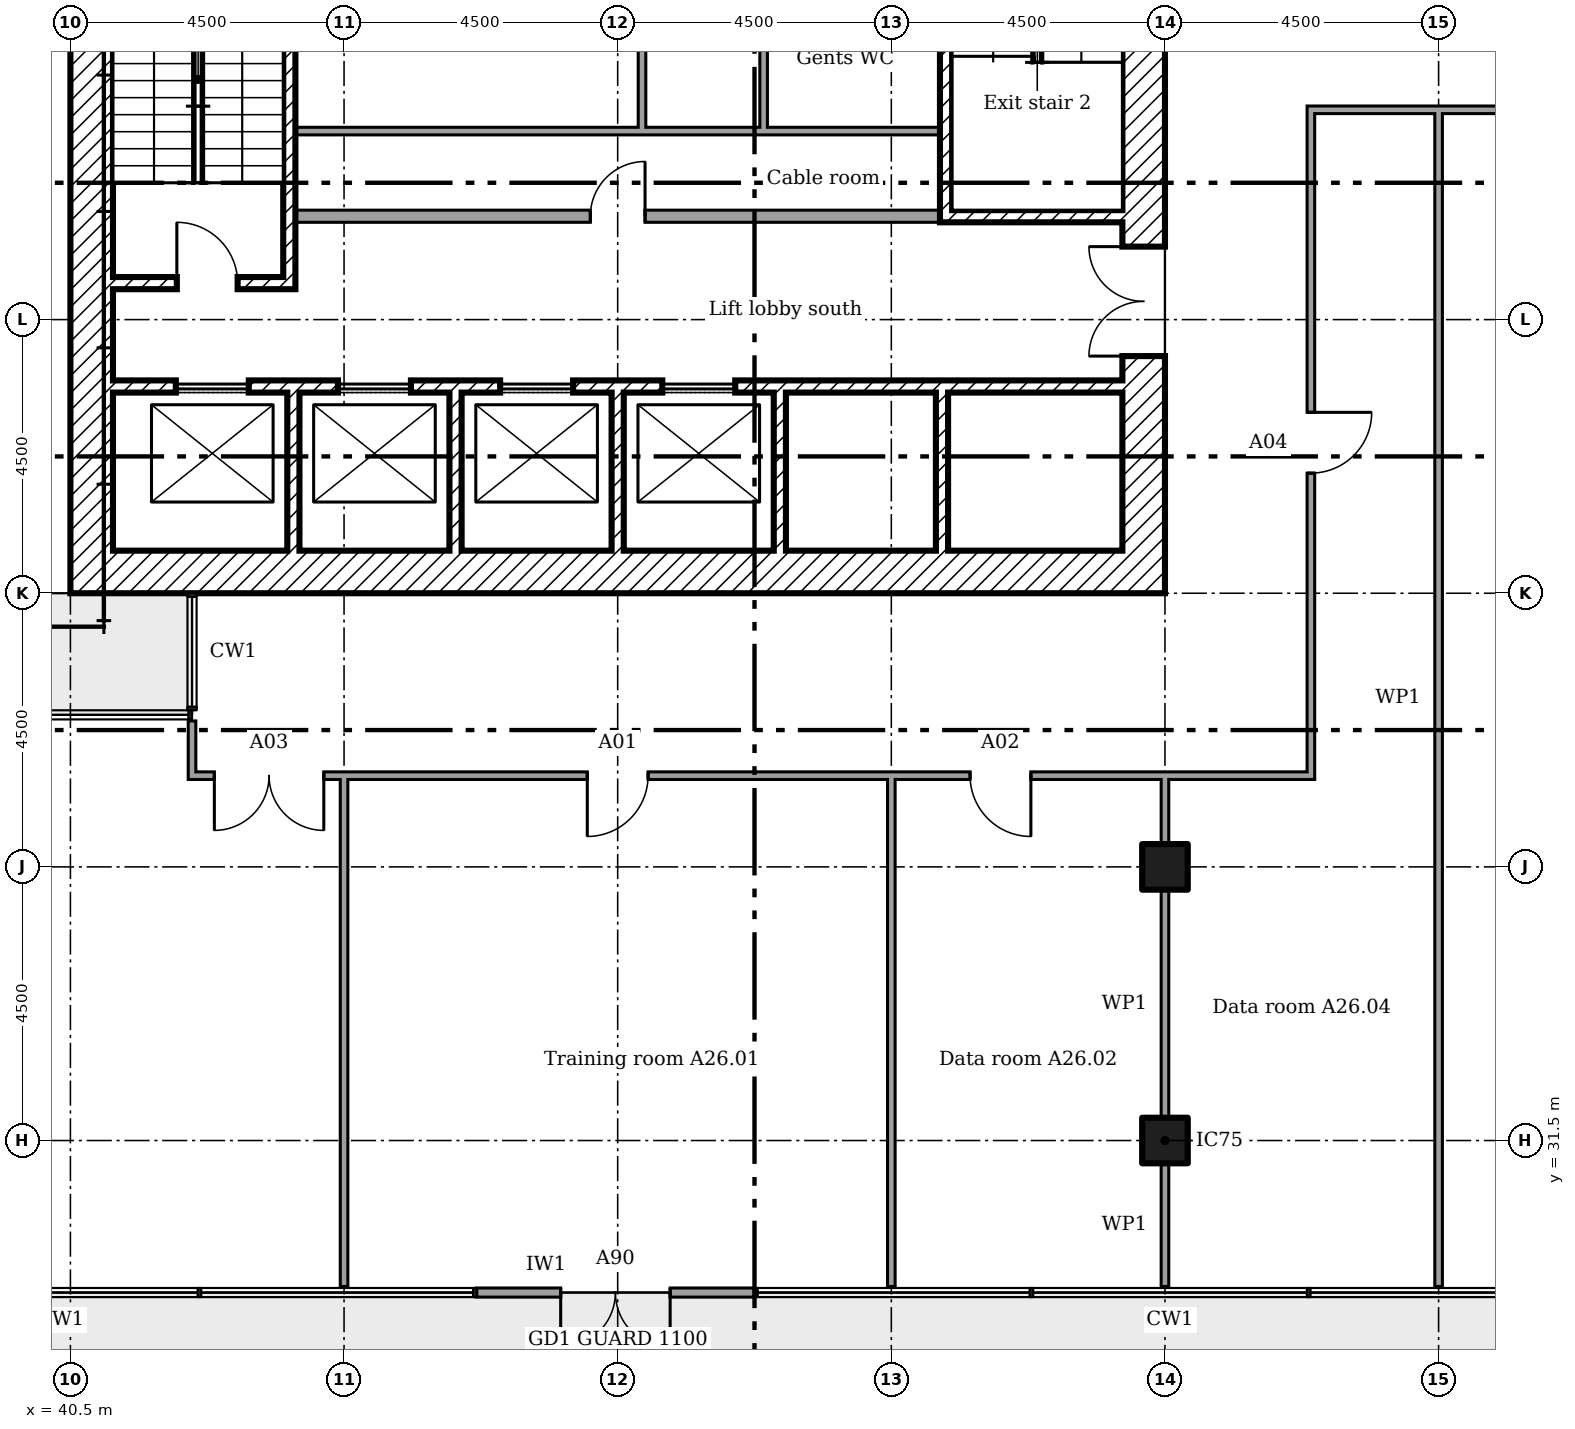
"""IFC4 building model, lengths in metres.
Left out: names, types, materials, properties, quantities, classifications, styles, units other than length and angle.
Written with IfcOpenShell. Run it as: python <this file> out.ifc"""

import sys

from ifc_helpers import new_model, si_unit, direction, frame, frame_2d, origin, origin_2d, place, context, subcontext, project, spatial, rectangle, extrude, element, fill, save


model = new_model("IFC4")
c1 = context("Model", 3, precision=1e-05, world=origin(), true_north=direction((0.0, 1.0)))
c2 = subcontext(c1, "Body", "Model", "MODEL_VIEW")
j1 = project(units=[si_unit("LENGTHUNIT", "METRE"), si_unit("PLANEANGLEUNIT", "RADIAN")], contexts=[c1])
p1 = place(None, origin())
s1 = spatial("IfcSite", under=j1, at=p1, CompositionType="ELEMENT")
p2 = place(p1, origin())
s2 = spatial("IfcBuilding", under=s1, at=p2, CompositionType="ELEMENT")
p3 = place(p2, frame((0.0, 0.0, 106.4)))
s3 = spatial("IfcBuildingStorey", under=s2, at=p3, CompositionType="ELEMENT", Elevation=106.4)
for number, where in (
    (1, (58.5, 31.5, 0.0)),
    (2, (58.5, 36.0, 0.0)),
):
    element("IfcColumn", number, at=place(p3, frame(where)), inside=s3, PredefinedType="COLUMN", context=c2, shape_type="SweptSolid", body=[
        extrude(rectangle(XDim=0.75, YDim=0.75, at=origin_2d()), origin(), (0.0, 0.0, 1.0), 3.6),
    ])
p4 = place(p3, frame((47.182, 29.0, 0.0)))
e3 = element("IfcWall", 3, at=p4, inside=s3, PredefinedType="SOLIDWALL", context=c2, shape_type="SweptSolid", body=[
    extrude(rectangle(XDim=4.561, YDim=0.15, at=frame_2d((2.28, 0.0))), origin(), (0.0, 0.0, 1.0), 3.45),
])
p5 = place(p4, frame((1.38, 0.0, 0.0)))
e4 = element("IfcOpeningElement", 4, at=p5, cuts=e3, PredefinedType="OPENING", context=c2, shape_type="SweptSolid", body=[
    extrude(rectangle(XDim=1.8, YDim=2.4, at=frame_2d((0.9, 1.2))), frame((0.0, 0.085, 0.0), z_axis=(0.0, -1.0, 0.0), x_axis=(1.0, 0.0, 0.0)), (0.0, 0.0, 1.0), 0.17),
])
p6 = place(p3, frame((58.15, 40.5, 0.0), z_axis=(0.0, 0.0, 1.0), x_axis=(0.0, 1.0, 0.0)))
e5 = element("IfcWall", 5, at=p6, inside=s3, PredefinedType="SHEAR", context=c2, shape_type="SweptSolid", body=[
    extrude(rectangle(XDim=18.0, YDim=0.7, at=frame_2d((9.0, 0.0))), origin(), (0.0, 0.0, 1.0), 3.35),
])
p7 = place(p6, frame((13.15, 0.0, 0.0)))
e6 = element("IfcOpeningElement", 6, at=p7, cuts=e5, PredefinedType="OPENING", context=c2, shape_type="SweptSolid", body=[
    extrude(rectangle(XDim=1.2, YDim=2.1, at=frame_2d((0.6, 1.05))), frame((0.0, 0.36, 0.0), z_axis=(0.0, -1.0, 0.0), x_axis=(1.0, 0.0, 0.0)), (0.0, 0.0, 1.0), 0.72),
])
p8 = place(p6, frame((3.9, 0.0, 0.0)))
e7 = element("IfcOpeningElement", 7, at=p8, cuts=e5, PredefinedType="OPENING", context=c2, shape_type="SweptSolid", body=[
    extrude(rectangle(XDim=1.8, YDim=2.1, at=frame_2d((0.9, 1.05))), frame((0.0, 0.36, 0.0), z_axis=(0.0, -1.0, 0.0), x_axis=(1.0, 0.0, 0.0)), (0.0, 0.0, 1.0), 0.72),
])
p9 = place(p6, frame((11.525, 0.0, 0.0)))
e8 = element("IfcOpeningElement", 8, at=p9, cuts=e5, PredefinedType="OPENING", context=c2, shape_type="SweptSolid", body=[
    extrude(rectangle(XDim=1.0, YDim=2.1, at=frame_2d((0.5, 1.05))), frame((0.0, 0.36, 0.0), z_axis=(0.0, -1.0, 0.0), x_axis=(1.0, 0.0, 0.0)), (0.0, 0.0, 1.0), 0.72),
])
p10 = place(p3, frame((41.2, 40.85, 0.0)))
e9 = element("IfcWall", 9, at=p10, inside=s3, PredefinedType="SHEAR", context=c2, shape_type="SweptSolid", body=[
    extrude(rectangle(XDim=16.6, YDim=0.7, at=frame_2d((8.3, 0.0))), origin(), (0.0, 0.0, 1.0), 3.35),
])
p11 = place(p3, frame((40.85, 40.5, 0.0), z_axis=(0.0, 0.0, 1.0), x_axis=(0.0, 1.0, 0.0)))
e10 = element("IfcWall", 10, at=p11, inside=s3, PredefinedType="SHEAR", context=c2, shape_type="SweptSolid", body=[
    extrude(rectangle(XDim=18.0, YDim=0.7, at=frame_2d((9.0, 0.0))), origin(), (0.0, 0.0, 1.0), 3.35),
])
for number, where, z_axis, x_axis in (
    (11, (44.167, 41.2, 0.0), (0.0, 0.0, 1.0), (0.0, 1.0, 0.0)),
    (12, (46.833, 41.2, 0.0), (0.0, 0.0, 1.0), (0.0, 1.0, 0.0)),
    (13, (49.5, 41.2, 0.0), (0.0, 0.0, 1.0), (0.0, 1.0, 0.0)),
    (14, (52.167, 41.2, 0.0), (0.0, 0.0, 1.0), (0.0, 1.0, 0.0)),
    (15, (54.833, 41.2, 0.0), (0.0, 0.0, 1.0), (0.0, 1.0, 0.0)),
):
    element("IfcWall", number, at=place(p3, frame(where, z_axis=z_axis, x_axis=x_axis)), inside=s3, PredefinedType="SHEAR", context=c2, shape_type="SweptSolid", body=[
        extrude(rectangle(XDim=2.6, YDim=0.2, at=frame_2d((1.3, 0.0))), origin(), (0.0, 0.0, 1.0), 3.35),
    ])
p12 = place(p3, frame((41.2, 43.9, 0.0)))
e16 = element("IfcWall", 16, at=p12, inside=s3, PredefinedType="SHEAR", context=c2, shape_type="SweptSolid", body=[
    extrude(rectangle(XDim=16.6, YDim=0.2, at=frame_2d((8.3, 0.0))), origin(), (0.0, 0.0, 1.0), 3.35),
])
p13 = place(p12, frame((1.033, 0.0, 0.0)))
e17 = element("IfcOpeningElement", 17, at=p13, cuts=e16, PredefinedType="OPENING", context=c2, shape_type="SweptSolid", body=[
    extrude(rectangle(XDim=1.2, YDim=2.1, at=frame_2d((0.6, 1.05))), frame((0.0, 0.11, 0.0), z_axis=(0.0, -1.0, 0.0), x_axis=(1.0, 0.0, 0.0)), (0.0, 0.0, 1.0), 0.22),
])
p14 = place(p12, frame((3.7, 0.0, 0.0)))
e18 = element("IfcOpeningElement", 18, at=p14, cuts=e16, PredefinedType="OPENING", context=c2, shape_type="SweptSolid", body=[
    extrude(rectangle(XDim=1.2, YDim=2.1, at=frame_2d((0.6, 1.05))), frame((0.0, 0.11, 0.0), z_axis=(0.0, -1.0, 0.0), x_axis=(1.0, 0.0, 0.0)), (0.0, 0.0, 1.0), 0.22),
])
p15 = place(p12, frame((6.367, 0.0, 0.0)))
e19 = element("IfcOpeningElement", 19, at=p15, cuts=e16, PredefinedType="OPENING", context=c2, shape_type="SweptSolid", body=[
    extrude(rectangle(XDim=1.2, YDim=2.1, at=frame_2d((0.6, 1.05))), frame((0.0, 0.11, 0.0), z_axis=(0.0, -1.0, 0.0), x_axis=(1.0, 0.0, 0.0)), (0.0, 0.0, 1.0), 0.22),
])
p16 = place(p12, frame((9.033, 0.0, 0.0)))
e20 = element("IfcOpeningElement", 20, at=p16, cuts=e16, PredefinedType="OPENING", context=c2, shape_type="SweptSolid", body=[
    extrude(rectangle(XDim=1.2, YDim=2.1, at=frame_2d((0.6, 1.05))), frame((0.0, 0.11, 0.0), z_axis=(0.0, -1.0, 0.0), x_axis=(1.0, 0.0, 0.0)), (0.0, 0.0, 1.0), 0.22),
])
p17 = place(p3, frame((44.1, 45.5, 0.0), z_axis=(0.0, 0.0, 1.0), x_axis=(0.0, 1.0, 0.0)))
e21 = element("IfcWall", 21, at=p17, inside=s3, PredefinedType="SHEAR", context=c2, shape_type="SweptSolid", body=[
    extrude(rectangle(XDim=6.9, YDim=0.2, at=frame_2d((3.45, 0.0))), origin(), (0.0, 0.0, 1.0), 3.35),
])
p18 = place(p3, frame((41.2, 45.6, 0.0)))
e22 = element("IfcWall", 22, at=p18, inside=s3, PredefinedType="SHEAR", context=c2, shape_type="SweptSolid", body=[
    extrude(rectangle(XDim=2.8, YDim=0.2, at=frame_2d((1.4, 0.0))), origin(), (0.0, 0.0, 1.0), 3.35),
])
p19 = place(p18, frame((1.05, 0.0, 0.0)))
e23 = element("IfcOpeningElement", 23, at=p19, cuts=e22, PredefinedType="OPENING", context=c2, shape_type="SweptSolid", body=[
    extrude(rectangle(XDim=1.0, YDim=2.1, at=frame_2d((0.5, 1.05))), frame((0.0, 0.11, 0.0), z_axis=(0.0, -1.0, 0.0), x_axis=(1.0, 0.0, 0.0)), (0.0, 0.0, 1.0), 0.22),
])
p20 = place(p3, frame((54.8, 46.7, 0.0)))
e24 = element("IfcWall", 24, at=p20, inside=s3, PredefinedType="SHEAR", context=c2, shape_type="SweptSolid", body=[
    extrude(rectangle(XDim=3.0, YDim=0.2, at=frame_2d((1.5, 0.0))), origin(), (0.0, 0.0, 1.0), 3.35),
])
p21 = place(p3, frame((54.9, 46.8, 0.0), z_axis=(0.0, 0.0, 1.0), x_axis=(0.0, 1.0, 0.0)))
e25 = element("IfcWall", 25, at=p21, inside=s3, PredefinedType="SHEAR", context=c2, shape_type="SweptSolid", body=[
    extrude(rectangle(XDim=6.5, YDim=0.2, at=frame_2d((3.25, 0.0))), origin(), (0.0, 0.0, 1.0), 3.35),
])
p22 = place(p3, frame((44.2, 46.7, 0.0)))
e26 = element("IfcWall", 26, at=p22, inside=s3, PredefinedType="PARTITIONING", context=c2, shape_type="SweptSolid", body=[
    extrude(rectangle(XDim=10.6, YDim=0.2, at=frame_2d((5.3, 0.0))), origin(), (0.0, 0.0, 1.0), 3.35),
])
p23 = place(p22, frame((4.85, 0.0, 0.0)))
e27 = element("IfcOpeningElement", 27, at=p23, cuts=e26, PredefinedType="OPENING", context=c2, shape_type="SweptSolid", body=[
    extrude(rectangle(XDim=0.9, YDim=2.1, at=frame_2d((0.45, 1.05))), frame((0.0, 0.11, 0.0), z_axis=(0.0, -1.0, 0.0), x_axis=(1.0, 0.0, 0.0)), (0.0, 0.0, 1.0), 0.22),
])
p24 = place(p3, frame((49.962, 48.1, 0.0), z_axis=(0.0, 0.0, 1.0), x_axis=(-1.0, 0.0, 0.0)))
e28 = element("IfcWall", 28, at=p24, inside=s3, PredefinedType="PARTITIONING", context=c2, shape_type="SweptSolid", body=[
    extrude(rectangle(XDim=5.762, YDim=0.125, at=frame_2d((2.881, 0.0))), origin(), (0.0, 0.0, 1.0), 3.35),
])
p25 = place(p3, frame((51.962, 48.1, 0.0), z_axis=(0.0, 0.0, 1.0), x_axis=(-1.0, 0.0, 0.0)))
e29 = element("IfcWall", 29, at=p25, inside=s3, PredefinedType="PARTITIONING", context=c2, shape_type="SweptSolid", body=[
    extrude(rectangle(XDim=2.062, YDim=0.125, at=frame_2d((1.031, 0.0))), origin(), (0.0, 0.0, 1.0), 3.35),
])
p26 = place(p3, frame((49.9, 48.163, 0.0), z_axis=(0.0, 0.0, 1.0), x_axis=(0.0, 1.0, 0.0)))
e30 = element("IfcWall", 30, at=p26, inside=s3, PredefinedType="PARTITIONING", context=c2, shape_type="SweptSolid", body=[
    extrude(rectangle(XDim=3.637, YDim=0.125, at=frame_2d((1.819, 0.0))), origin(), (0.0, 0.0, 1.0), 3.35),
])
p27 = place(p3, frame((54.8, 48.1, 0.0), z_axis=(0.0, 0.0, 1.0), x_axis=(-1.0, 0.0, 0.0)))
e31 = element("IfcWall", 31, at=p27, inside=s3, PredefinedType="PARTITIONING", context=c2, shape_type="SweptSolid", body=[
    extrude(rectangle(XDim=2.9, YDim=0.125, at=frame_2d((1.45, 0.0))), origin(), (0.0, 0.0, 1.0), 3.35),
])
p28 = place(p3, frame((51.9, 48.163, 0.0), z_axis=(0.0, 0.0, 1.0), x_axis=(0.0, 1.0, 0.0)))
e32 = element("IfcWall", 32, at=p28, inside=s3, PredefinedType="PARTITIONING", context=c2, shape_type="SweptSolid", body=[
    extrude(rectangle(XDim=3.637, YDim=0.125, at=frame_2d((1.819, 0.0))), origin(), (0.0, 0.0, 1.0), 3.35),
])
p29 = place(p3, frame((42.438, 37.5, 0.0)))
e33 = element("IfcWall", 33, at=p29, inside=s3, PredefinedType="PARTITIONING", context=c2, shape_type="SweptSolid", body=[
    extrude(rectangle(XDim=18.525, YDim=0.125, at=frame_2d((9.262, 0.0))), origin(), (0.0, 0.0, 1.0), 3.45),
])
p30 = place(p29, frame((6.562, 0.0, 0.0)))
e34 = element("IfcOpeningElement", 34, at=p30, cuts=e33, PredefinedType="OPENING", context=c2, shape_type="SweptSolid", body=[
    extrude(rectangle(XDim=1.0, YDim=2.1, at=frame_2d((0.5, 1.05))), frame((0.0, 0.073, 0.0), z_axis=(0.0, -1.0, 0.0), x_axis=(1.0, 0.0, 0.0)), (0.0, 0.0, 1.0), 0.145),
])
p31 = place(p29, frame((12.857, 0.0, 0.0)))
e35 = element("IfcOpeningElement", 35, at=p31, cuts=e33, PredefinedType="OPENING", context=c2, shape_type="SweptSolid", body=[
    extrude(rectangle(XDim=1.0, YDim=2.1, at=frame_2d((0.5, 1.05))), frame((0.0, 0.073, 0.0), z_axis=(0.0, -1.0, 0.0), x_axis=(1.0, 0.0, 0.0)), (0.0, 0.0, 1.0), 0.145),
])
p32 = place(p29, frame((0.429, 0.0, 0.0)))
e36 = element("IfcOpeningElement", 36, at=p32, cuts=e33, PredefinedType="OPENING", context=c2, shape_type="SweptSolid", body=[
    extrude(rectangle(XDim=1.8, YDim=2.1, at=frame_2d((0.9, 1.05))), frame((0.0, 0.073, 0.0), z_axis=(0.0, -1.0, 0.0), x_axis=(1.0, 0.0, 0.0)), (0.0, 0.0, 1.0), 0.145),
])
p33 = place(p3, frame((60.837, 48.45, 0.0)))
e37 = element("IfcWall", 37, at=p33, inside=s3, PredefinedType="PARTITIONING", context=c2, shape_type="SweptSolid", body=[
    extrude(rectangle(XDim=9.062, YDim=0.125, at=frame_2d((4.531, 0.0))), origin(), (0.0, 0.0, 1.0), 3.45),
])
p34 = place(p33, frame((3.978, 0.0, 0.0)))
e38 = element("IfcOpeningElement", 38, at=p34, cuts=e37, PredefinedType="OPENING", context=c2, shape_type="SweptSolid", body=[
    extrude(rectangle(XDim=1.8, YDim=2.1, at=frame_2d((0.9, 1.05))), frame((0.0, 0.073, 0.0), z_axis=(0.0, -1.0, 0.0), x_axis=(1.0, 0.0, 0.0)), (0.0, 0.0, 1.0), 0.145),
])
p35 = place(p3, frame((42.5, 37.562, 0.0), z_axis=(0.0, 0.0, 1.0), x_axis=(0.0, 1.0, 0.0)))
e39 = element("IfcWall", 39, at=p35, inside=s3, PredefinedType="PARTITIONING", context=c2, shape_type="SweptSolid", body=[
    extrude(rectangle(XDim=0.837, YDim=0.125, at=frame_2d((0.419, 0.0))), origin(), (0.0, 0.0, 1.0), 3.45),
])
for number, where, z_axis, x_axis in (
    (40, (45.0, 29.1, 0.0), (0.0, 0.0, 1.0), (0.0, 1.0, 0.0)),
    (41, (54.0, 29.1, 0.0), (0.0, 0.0, 1.0), (0.0, 1.0, 0.0)),
):
    element("IfcWall", number, at=place(p3, frame(where, z_axis=z_axis, x_axis=x_axis)), inside=s3, PredefinedType="PARTITIONING", context=c2, shape_type="SweptSolid", body=[
        extrude(rectangle(XDim=8.4, YDim=0.125, at=frame_2d((4.2, 0.0))), origin(), (0.0, 0.0, 1.0), 2.766),
    ])
p36 = place(p3, frame((58.5, 29.1, 0.0), z_axis=(0.0, 0.0, 1.0), x_axis=(0.0, 1.0, 0.0)))
e42 = element("IfcWall", 42, at=p36, inside=s3, PredefinedType="PARTITIONING", context=c2, shape_type="SweptSolid", body=[
    extrude(rectangle(XDim=2.025, YDim=0.125, at=frame_2d((1.012, 0.0))), origin(), (0.0, 0.0, 1.0), 2.676),
])
p37 = place(p3, frame((58.5, 31.875, 0.0), z_axis=(0.0, 0.0, 1.0), x_axis=(0.0, 1.0, 0.0)))
e43 = element("IfcWall", 43, at=p37, inside=s3, PredefinedType="PARTITIONING", context=c2, shape_type="SweptSolid", body=[
    extrude(rectangle(XDim=3.75, YDim=0.125, at=frame_2d((1.875, 0.0))), origin(), (0.0, 0.0, 1.0), 2.676),
])
p38 = place(p3, frame((58.5, 36.375, 0.0), z_axis=(0.0, 0.0, 1.0), x_axis=(0.0, 1.0, 0.0)))
e44 = element("IfcWall", 44, at=p38, inside=s3, PredefinedType="PARTITIONING", context=c2, shape_type="SweptSolid", body=[
    extrude(rectangle(XDim=1.125, YDim=0.125, at=frame_2d((0.562, 0.0))), origin(), (0.0, 0.0, 1.0), 2.676),
])
p39 = place(p3, frame((60.9, 37.562, 0.0), z_axis=(0.0, 0.0, 1.0), x_axis=(0.0, 1.0, 0.0)))
e45 = element("IfcWall", 45, at=p39, inside=s3, PredefinedType="PARTITIONING", context=c2, shape_type="SweptSolid", body=[
    extrude(rectangle(XDim=10.825, YDim=0.125, at=frame_2d((5.413, 0.0))), origin(), (0.0, 0.0, 1.0), 3.45),
])
p40 = place(p39, frame((4.913, 0.0, 0.0)))
e46 = element("IfcOpeningElement", 46, at=p40, cuts=e45, PredefinedType="OPENING", context=c2, shape_type="SweptSolid", body=[
    extrude(rectangle(XDim=1.0, YDim=2.1, at=frame_2d((0.5, 1.05))), frame((0.0, 0.073, 0.0), z_axis=(0.0, -1.0, 0.0), x_axis=(1.0, 0.0, 0.0)), (0.0, 0.0, 1.0), 0.145),
])
p41 = place(p3, frame((63.0, 29.1, 0.0), z_axis=(0.0, 0.0, 1.0), x_axis=(0.0, 1.0, 0.0)))
e47 = element("IfcWall", 47, at=p41, inside=s3, PredefinedType="PARTITIONING", context=c2, shape_type="SweptSolid", body=[
    extrude(rectangle(XDim=19.35, YDim=0.125, at=frame_2d((9.675, 0.0))), origin(), (0.0, 0.0, 1.0), 3.45),
])
p42 = place(p5, frame((1.8, 0.0, 0.0), x_axis=(-1.0, 0.0, 0.0)))
e48 = element("IfcDoor", 48, at=p42, inside=s3, OperationType="DOUBLE_DOOR_DOUBLE_SWING", PredefinedType="NOTDEFINED", context=c2, shape_type="SweptSolid", body=[
    extrude(rectangle(XDim=1.8, YDim=2.4, at=frame_2d((0.9, 1.2))), frame((0.0, 0.025, 0.0), z_axis=(0.0, -1.0, 0.0), x_axis=(1.0, 0.0, 0.0)), (0.0, 0.0, 1.0), 0.05),
])
fill(e4, e48)
p43 = place(p8, origin())
e49 = element("IfcDoor", 49, at=p43, inside=s3, OperationType="DOUBLE_DOOR_SINGLE_SWING", PredefinedType="DOOR", context=c2, shape_type="SweptSolid", body=[
    extrude(rectangle(XDim=1.8, YDim=2.1, at=frame_2d((0.9, 1.05))), frame((0.0, 0.025, 0.0), z_axis=(0.0, -1.0, 0.0), x_axis=(1.0, 0.0, 0.0)), (0.0, 0.0, 1.0), 0.05),
])
fill(e7, e49)
p44 = place(p19, origin())
e50 = element("IfcDoor", 50, at=p44, inside=s3, OperationType="SINGLE_SWING_RIGHT", PredefinedType="DOOR", context=c2, shape_type="SweptSolid", body=[
    extrude(rectangle(XDim=1.0, YDim=2.1, at=frame_2d((0.5, 1.05))), frame((0.0, 0.025, 0.0), z_axis=(0.0, -1.0, 0.0), x_axis=(1.0, 0.0, 0.0)), (0.0, 0.0, 1.0), 0.05),
])
fill(e23, e50)
p45 = place(p23, origin())
e51 = element("IfcDoor", 51, at=p45, inside=s3, OperationType="SINGLE_SWING_LEFT", PredefinedType="DOOR", context=c2, shape_type="SweptSolid", body=[
    extrude(rectangle(XDim=0.9, YDim=2.1, at=frame_2d((0.45, 1.05))), frame((0.0, 0.025, 0.0), z_axis=(0.0, -1.0, 0.0), x_axis=(1.0, 0.0, 0.0)), (0.0, 0.0, 1.0), 0.05),
])
fill(e27, e51)
p46 = place(p13, origin())
e52 = element("IfcDoor", 52, at=p46, inside=s3, OperationType="SLIDING_TO_LEFT", PredefinedType="DOOR", context=c2, shape_type="SweptSolid", body=[
    extrude(rectangle(XDim=1.2, YDim=2.1, at=frame_2d((0.6, 1.05))), frame((0.0, 0.025, 0.0), z_axis=(0.0, -1.0, 0.0), x_axis=(1.0, 0.0, 0.0)), (0.0, 0.0, 1.0), 0.05),
])
fill(e17, e52)
p47 = place(p14, origin())
e53 = element("IfcDoor", 53, at=p47, inside=s3, OperationType="SLIDING_TO_LEFT", PredefinedType="DOOR", context=c2, shape_type="SweptSolid", body=[
    extrude(rectangle(XDim=1.2, YDim=2.1, at=frame_2d((0.6, 1.05))), frame((0.0, 0.025, 0.0), z_axis=(0.0, -1.0, 0.0), x_axis=(1.0, 0.0, 0.0)), (0.0, 0.0, 1.0), 0.05),
])
fill(e18, e53)
p48 = place(p15, origin())
e54 = element("IfcDoor", 54, at=p48, inside=s3, OperationType="SLIDING_TO_LEFT", PredefinedType="DOOR", context=c2, shape_type="SweptSolid", body=[
    extrude(rectangle(XDim=1.2, YDim=2.1, at=frame_2d((0.6, 1.05))), frame((0.0, 0.025, 0.0), z_axis=(0.0, -1.0, 0.0), x_axis=(1.0, 0.0, 0.0)), (0.0, 0.0, 1.0), 0.05),
])
fill(e19, e54)
p49 = place(p16, origin())
e55 = element("IfcDoor", 55, at=p49, inside=s3, OperationType="SLIDING_TO_LEFT", PredefinedType="DOOR", context=c2, shape_type="SweptSolid", body=[
    extrude(rectangle(XDim=1.2, YDim=2.1, at=frame_2d((0.6, 1.05))), frame((0.0, 0.025, 0.0), z_axis=(0.0, -1.0, 0.0), x_axis=(1.0, 0.0, 0.0)), (0.0, 0.0, 1.0), 0.05),
])
fill(e20, e55)
p50 = place(p30, frame((1.0, 0.0, 0.0), x_axis=(-1.0, 0.0, 0.0)))
e56 = element("IfcDoor", 56, at=p50, inside=s3, OperationType="SINGLE_SWING_LEFT", PredefinedType="DOOR", context=c2, shape_type="SweptSolid", body=[
    extrude(rectangle(XDim=1.0, YDim=2.1, at=frame_2d((0.5, 1.05))), frame((0.0, 0.025, 0.0), z_axis=(0.0, -1.0, 0.0), x_axis=(1.0, 0.0, 0.0)), (0.0, 0.0, 1.0), 0.05),
])
fill(e34, e56)
p51 = place(p31, frame((1.0, 0.0, 0.0), x_axis=(-1.0, 0.0, 0.0)))
e57 = element("IfcDoor", 57, at=p51, inside=s3, OperationType="SINGLE_SWING_RIGHT", PredefinedType="DOOR", context=c2, shape_type="SweptSolid", body=[
    extrude(rectangle(XDim=1.0, YDim=2.1, at=frame_2d((0.5, 1.05))), frame((0.0, 0.025, 0.0), z_axis=(0.0, -1.0, 0.0), x_axis=(1.0, 0.0, 0.0)), (0.0, 0.0, 1.0), 0.05),
])
fill(e35, e57)
p52 = place(p32, frame((1.8, 0.0, 0.0), x_axis=(-1.0, 0.0, 0.0)))
e58 = element("IfcDoor", 58, at=p52, inside=s3, OperationType="DOUBLE_DOOR_SINGLE_SWING", PredefinedType="DOOR", context=c2, shape_type="SweptSolid", body=[
    extrude(rectangle(XDim=1.8, YDim=2.1, at=frame_2d((0.9, 1.05))), frame((0.0, 0.025, 0.0), z_axis=(0.0, -1.0, 0.0), x_axis=(1.0, 0.0, 0.0)), (0.0, 0.0, 1.0), 0.05),
])
fill(e36, e58)
p53 = place(p40, frame((1.0, 0.0, 0.0), x_axis=(-1.0, 0.0, 0.0)))
e59 = element("IfcDoor", 59, at=p53, inside=s3, OperationType="SINGLE_SWING_RIGHT", PredefinedType="DOOR", context=c2, shape_type="SweptSolid", body=[
    extrude(rectangle(XDim=1.0, YDim=2.1, at=frame_2d((0.5, 1.05))), frame((0.0, 0.025, 0.0), z_axis=(0.0, -1.0, 0.0), x_axis=(1.0, 0.0, 0.0)), (0.0, 0.0, 1.0), 0.05),
])
fill(e46, e59)
save(model, sys.argv[1])
